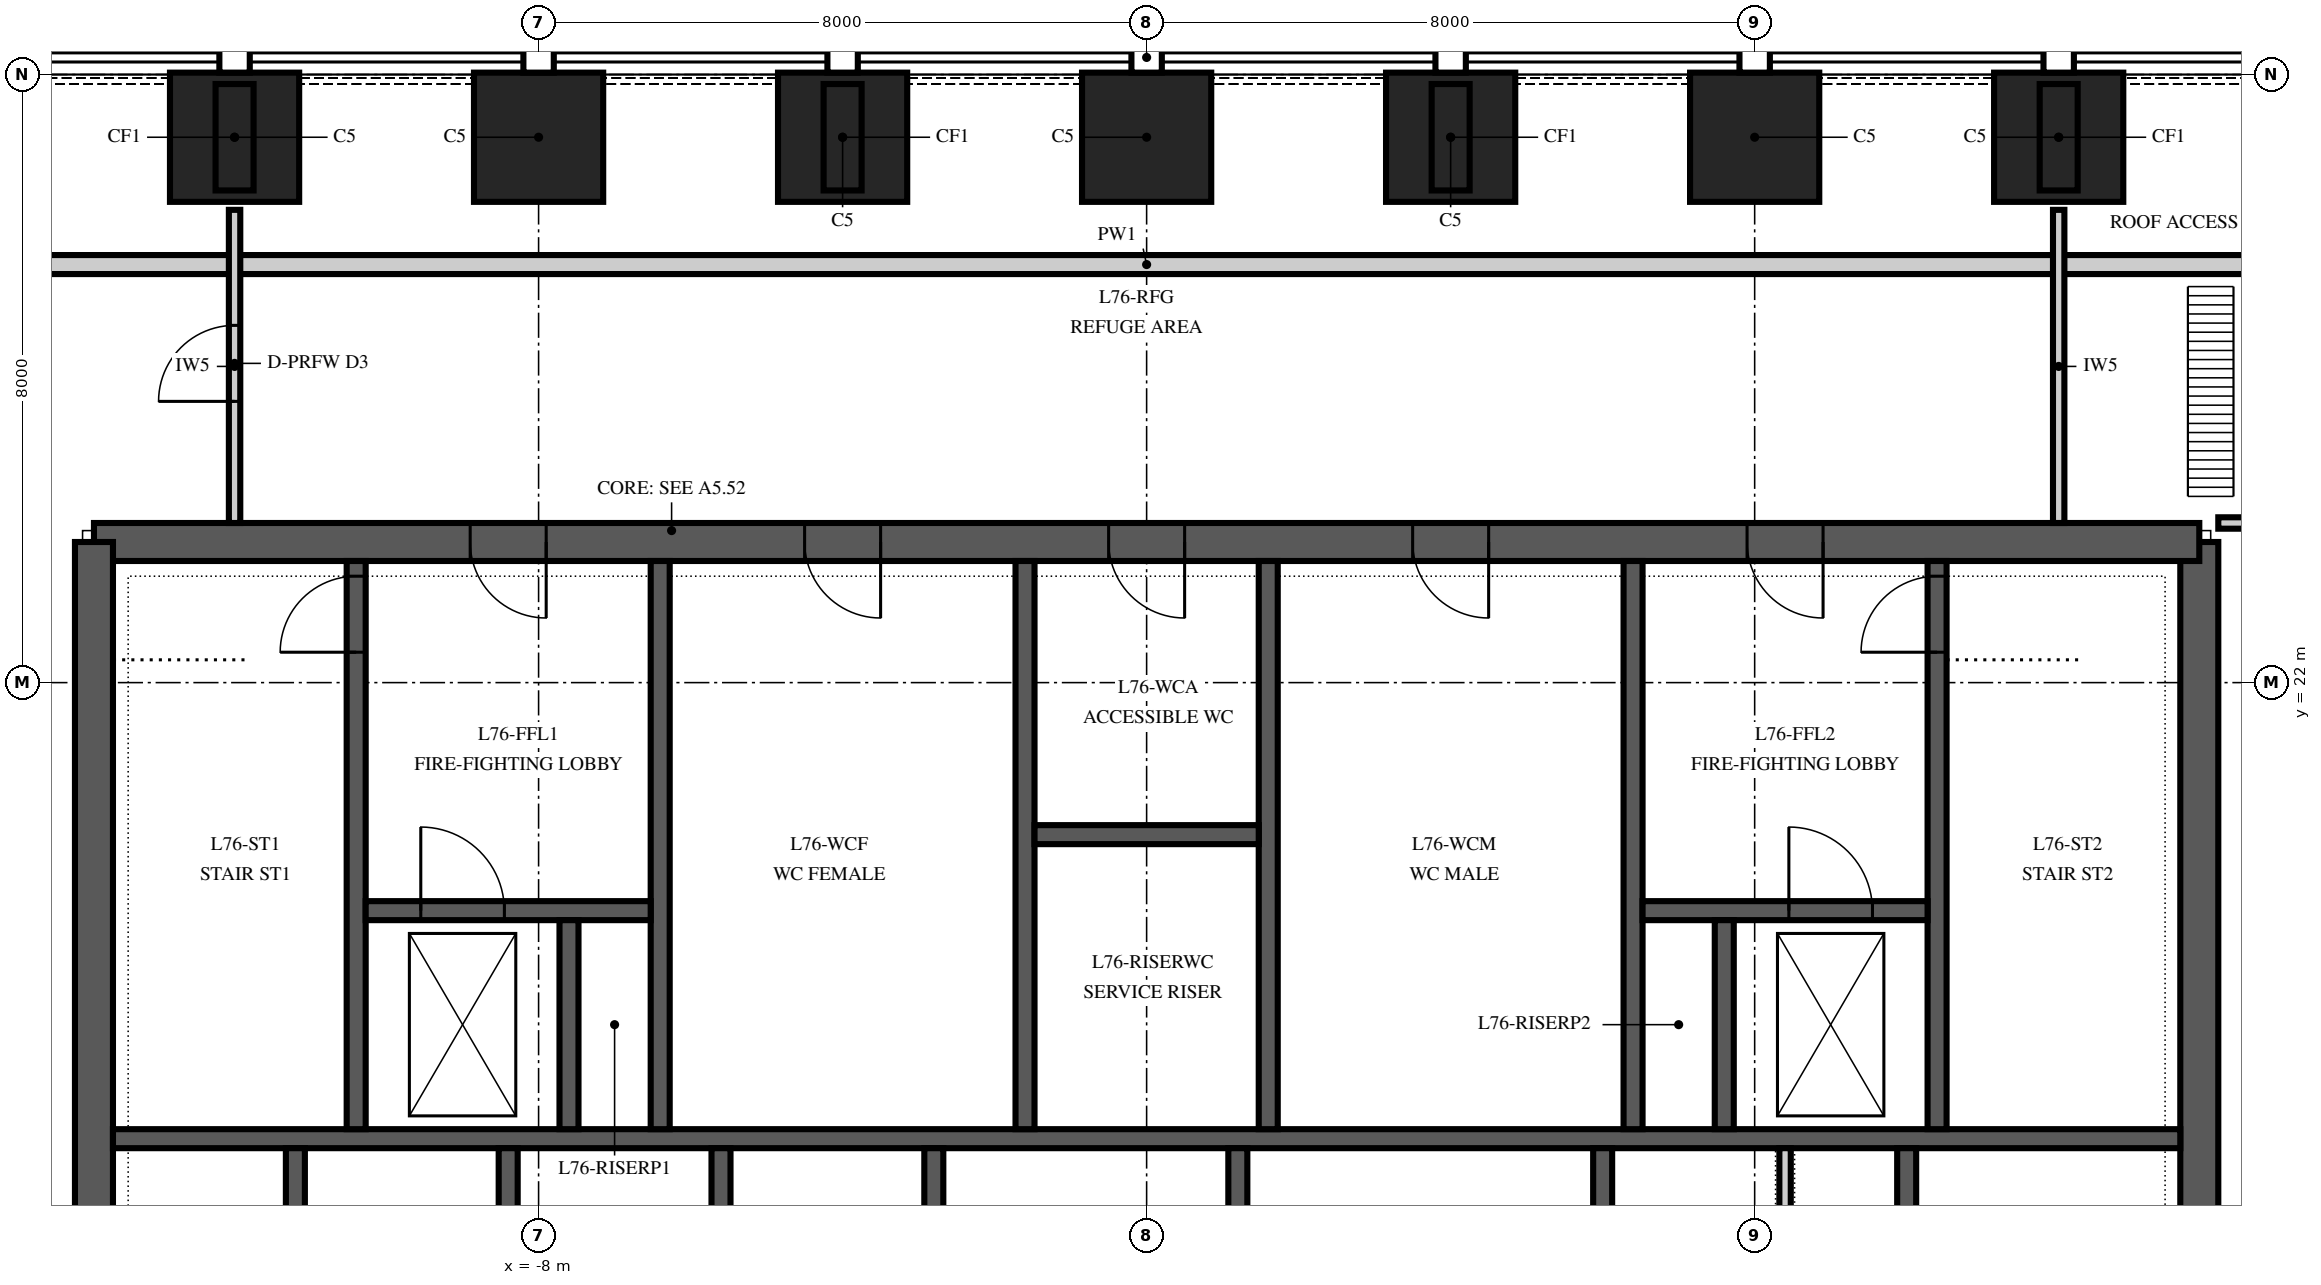
"""IFC4 building model, lengths in metres.
Left out: names, types, materials, properties, quantities, classifications, styles, units other than length and angle.
Written with IfcOpenShell. Run it as: python <this file> out.ifc"""

import sys

from ifc_helpers import new_model, si_unit, direction, frame, frame_2d, origin, origin_2d, place, context, subcontext, project, spatial, polyline, rectangle, hollow_rectangle, outline, extrude, element, fill, save


model = new_model("IFC4")
c1 = context("Model", 3, precision=1e-05, world=origin(), true_north=direction((0.0, 1.0)))
c2 = subcontext(c1, "Body", "Model", "MODEL_VIEW")
j1 = project(units=[si_unit("LENGTHUNIT", "METRE"), si_unit("PLANEANGLEUNIT", "RADIAN")], contexts=[c1])
p1 = place(None, origin())
s1 = spatial("IfcSite", under=j1, at=p1, CompositionType="ELEMENT")
p2 = place(p1, origin())
s2 = spatial("IfcBuilding", under=s1, at=p2, CompositionType="ELEMENT")
p3 = place(p2, frame((0.0, 0.0, 324.0)))
s3 = spatial("IfcBuildingStorey", under=s2, at=p3, CompositionType="ELEMENT", Elevation=324.0)
for number, where, z_axis, x_axis in (
    (1, (12.0, 29.175, 0.0), (0.0, 0.0, 1.0), (-1.0, 0.0, 0.0)),
    (2, (8.0, 29.175, 0.0), (0.0, 0.0, 1.0), (-1.0, 0.0, 0.0)),
    (3, (4.0, 29.175, 0.0), (0.0, 0.0, 1.0), (-1.0, 0.0, 0.0)),
    (4, (0.0, 29.175, 0.0), (0.0, 0.0, 1.0), (-1.0, 0.0, 0.0)),
    (5, (-4.0, 29.175, 0.0), (0.0, 0.0, 1.0), (-1.0, 0.0, 0.0)),
    (6, (-8.0, 29.175, 0.0), (0.0, 0.0, 1.0), (-1.0, 0.0, 0.0)),
    (7, (-12.0, 29.175, 0.0), (0.0, 0.0, 1.0), (-1.0, 0.0, 0.0)),
):
    element("IfcColumn", number, at=place(p3, frame(where, z_axis=z_axis, x_axis=x_axis)), inside=s3, PredefinedType="COLUMN", context=c2, shape_type="SweptSolid", body=[
        extrude(rectangle(XDim=1.7, YDim=1.7, at=origin_2d()), origin(), (0.0, 0.0, 1.0), 6.0),
    ])
p4 = place(p3, frame((13.85, 6.15, 0.0), z_axis=(0.0, 0.0, 1.0), x_axis=(0.0, 1.0, 0.0)))
e8 = element("IfcWall", 8, at=p4, inside=s3, PredefinedType="SHEAR", context=c2, shape_type="SweptSolid", body=[
    extrude(outline(polyline([(0.0, -0.25), (17.7, -0.25), (17.7, 0.0), (17.45, 0.0), (17.45, 0.25), (0.25, 0.25), (0.25, 0.0), (0.0, 0.0), (0.0, -0.25)])), origin(), (0.0, 0.0, 1.0), 6.0),
])
p5 = place(p4, frame((4.15, 0.0, 0.0)))
e9 = element("IfcOpeningElement", 9, at=p5, cuts=e8, PredefinedType="OPENING", context=c2, shape_type="SweptSolid", body=[
    extrude(rectangle(XDim=1.8, YDim=2.4, at=frame_2d((0.9, 1.2))), frame((0.0, 0.265, 0.0), z_axis=(0.0, -1.0, 0.0), x_axis=(1.0, 0.0, 0.0)), (0.0, 0.0, 1.0), 0.53),
])
p6 = place(p3, frame((13.85, 23.85, 0.0), z_axis=(0.0, 0.0, 1.0), x_axis=(-1.0, 0.0, 0.0)))
e10 = element("IfcWall", 10, at=p6, inside=s3, PredefinedType="SHEAR", context=c2, shape_type="SweptSolid", body=[
    extrude(rectangle(XDim=27.7, YDim=0.5, at=frame_2d((13.85, 0.0))), origin(), (0.0, 0.0, 1.0), 6.0),
])
p7 = place(p6, frame((21.75, 0.0, 0.0)))
e11 = element("IfcOpeningElement", 11, at=p7, cuts=e10, PredefinedType="OPENING", context=c2, shape_type="SweptSolid", body=[
    extrude(rectangle(XDim=1.0, YDim=2.1, at=frame_2d((0.5, 1.05))), frame((0.0, 0.265, 0.0), z_axis=(0.0, -1.0, 0.0), x_axis=(1.0, 0.0, 0.0)), (0.0, 0.0, 1.0), 0.53),
])
p8 = place(p6, frame((4.95, 0.0, 0.0)))
e12 = element("IfcOpeningElement", 12, at=p8, cuts=e10, PredefinedType="OPENING", context=c2, shape_type="SweptSolid", body=[
    extrude(rectangle(XDim=1.0, YDim=2.1, at=frame_2d((0.5, 1.05))), frame((0.0, 0.265, 0.0), z_axis=(0.0, -1.0, 0.0), x_axis=(1.0, 0.0, 0.0)), (0.0, 0.0, 1.0), 0.53),
])
p9 = place(p6, frame((17.35, 0.0, 0.0)))
e13 = element("IfcOpeningElement", 13, at=p9, cuts=e10, PredefinedType="OPENING", context=c2, shape_type="SweptSolid", body=[
    extrude(rectangle(XDim=1.0, YDim=2.1, at=frame_2d((0.5, 1.05))), frame((0.0, 0.265, 0.0), z_axis=(0.0, -1.0, 0.0), x_axis=(1.0, 0.0, 0.0)), (0.0, 0.0, 1.0), 0.53),
])
p10 = place(p6, frame((13.35, 0.0, 0.0)))
e14 = element("IfcOpeningElement", 14, at=p10, cuts=e10, PredefinedType="OPENING", context=c2, shape_type="SweptSolid", body=[
    extrude(rectangle(XDim=1.0, YDim=2.1, at=frame_2d((0.5, 1.05))), frame((0.0, 0.265, 0.0), z_axis=(0.0, -1.0, 0.0), x_axis=(1.0, 0.0, 0.0)), (0.0, 0.0, 1.0), 0.53),
])
p11 = place(p6, frame((9.35, 0.0, 0.0)))
e15 = element("IfcOpeningElement", 15, at=p11, cuts=e10, PredefinedType="OPENING", context=c2, shape_type="SweptSolid", body=[
    extrude(rectangle(XDim=1.0, YDim=2.1, at=frame_2d((0.5, 1.05))), frame((0.0, 0.265, 0.0), z_axis=(0.0, -1.0, 0.0), x_axis=(1.0, 0.0, 0.0)), (0.0, 0.0, 1.0), 0.53),
])
p12 = place(p3, frame((-13.85, 23.85, 0.0), z_axis=(0.0, 0.0, 1.0), x_axis=(0.0, -1.0, 0.0)))
e16 = element("IfcWall", 16, at=p12, inside=s3, PredefinedType="SHEAR", context=c2, shape_type="SweptSolid", body=[
    extrude(outline(polyline([(0.0, -0.25), (17.7, -0.25), (17.7, 0.0), (17.45, 0.0), (17.45, 0.25), (0.25, 0.25), (0.25, 0.0), (0.0, 0.0), (0.0, -0.25)])), origin(), (0.0, 0.0, 1.0), 6.0),
])
p13 = place(p12, frame((11.75, 0.0, 0.0)))
e17 = element("IfcOpeningElement", 17, at=p13, cuts=e16, PredefinedType="OPENING", context=c2, shape_type="SweptSolid", body=[
    extrude(rectangle(XDim=1.8, YDim=2.4, at=frame_2d((0.9, 1.2))), frame((0.0, 0.265, 0.0), z_axis=(0.0, -1.0, 0.0), x_axis=(1.0, 0.0, 0.0)), (0.0, 0.0, 1.0), 0.53),
])
p14 = place(p3, frame((-13.6, 16.0, 0.0), z_axis=(0.0, 0.0, 1.0), x_axis=(1.0, 0.0, 0.0)))
e18 = element("IfcWall", 18, at=p14, inside=s3, PredefinedType="SHEAR", context=c2, shape_type="SweptSolid", body=[
    extrude(rectangle(XDim=27.2, YDim=0.25, at=frame_2d((13.6, 0.0))), origin(), (0.0, 0.0, 1.0), 6.0),
])
for number, where, z_axis, x_axis in (
    (19, (-11.2, 13.125, 0.0), (0.0, 0.0, 1.0), (0.0, 1.0, 0.0)),
    (20, (-8.4, 13.125, 0.0), (0.0, 0.0, 1.0), (0.0, 1.0, 0.0)),
    (21, (-5.6, 13.125, 0.0), (0.0, 0.0, 1.0), (0.0, 1.0, 0.0)),
    (22, (-2.8, 13.125, 0.0), (0.0, 0.0, 1.0), (0.0, 1.0, 0.0)),
    (23, (1.2, 13.125, 0.0), (0.0, 0.0, 1.0), (0.0, 1.0, 0.0)),
    (24, (6.0, 13.125, 0.0), (0.0, 0.0, 1.0), (0.0, 1.0, 0.0)),
    (25, (10.0, 13.125, 0.0), (0.0, 0.0, 1.0), (0.0, 1.0, 0.0)),
):
    element("IfcWall", number, at=place(p3, frame(where, z_axis=z_axis, x_axis=x_axis)), inside=s3, PredefinedType="SHEAR", context=c2, shape_type="SweptSolid", body=[
        extrude(rectangle(XDim=2.75, YDim=0.25, at=frame_2d((1.375, 0.0))), origin(), (0.0, 0.0, 1.0), 6.0),
    ])
p15 = place(p3, frame((-10.4, 16.125, 0.0), z_axis=(0.0, 0.0, 1.0), x_axis=(0.0, 1.0, 0.0)))
e26 = element("IfcWall", 26, at=p15, inside=s3, PredefinedType="SHEAR", context=c2, shape_type="SweptSolid", body=[
    extrude(rectangle(XDim=7.475, YDim=0.25, at=frame_2d((3.738, 0.0))), origin(), (0.0, 0.0, 1.0), 6.0),
])
p16 = place(p15, frame((6.275, 0.0, 0.0)))
e27 = element("IfcOpeningElement", 27, at=p16, cuts=e26, PredefinedType="OPENING", context=c2, shape_type="SweptSolid", body=[
    extrude(rectangle(XDim=1.0, YDim=2.1, at=frame_2d((0.5, 1.05))), frame((0.0, 0.14, 0.0), z_axis=(0.0, -1.0, 0.0), x_axis=(1.0, 0.0, 0.0)), (0.0, 0.0, 1.0), 0.28),
])
for number, where, z_axis, x_axis in (
    (28, (-6.4, 16.125, 0.0), (0.0, 0.0, 1.0), (0.0, 1.0, 0.0)),
    (29, (-1.6, 16.125, 0.0), (0.0, 0.0, 1.0), (0.0, 1.0, 0.0)),
    (30, (1.6, 16.125, 0.0), (0.0, 0.0, 1.0), (0.0, 1.0, 0.0)),
    (31, (6.4, 16.125, 0.0), (0.0, 0.0, 1.0), (0.0, 1.0, 0.0)),
):
    element("IfcWall", number, at=place(p3, frame(where, z_axis=z_axis, x_axis=x_axis)), inside=s3, PredefinedType="SHEAR", context=c2, shape_type="SweptSolid", body=[
        extrude(rectangle(XDim=7.475, YDim=0.25, at=frame_2d((3.738, 0.0))), origin(), (0.0, 0.0, 1.0), 6.0),
    ])
p17 = place(p3, frame((10.4, 16.125, 0.0), z_axis=(0.0, 0.0, 1.0), x_axis=(0.0, 1.0, 0.0)))
e32 = element("IfcWall", 32, at=p17, inside=s3, PredefinedType="SHEAR", context=c2, shape_type="SweptSolid", body=[
    extrude(rectangle(XDim=7.475, YDim=0.25, at=frame_2d((3.738, 0.0))), origin(), (0.0, 0.0, 1.0), 6.0),
])
p18 = place(p17, frame((6.275, 0.0, 0.0)))
e33 = element("IfcOpeningElement", 33, at=p18, cuts=e32, PredefinedType="OPENING", context=c2, shape_type="SweptSolid", body=[
    extrude(rectangle(XDim=1.0, YDim=2.1, at=frame_2d((0.5, 1.05))), frame((0.0, 0.14, 0.0), z_axis=(0.0, -1.0, 0.0), x_axis=(1.0, 0.0, 0.0)), (0.0, 0.0, 1.0), 0.28),
])
p19 = place(p3, frame((-10.275, 19.0, 0.0), z_axis=(0.0, 0.0, 1.0), x_axis=(1.0, 0.0, 0.0)))
e34 = element("IfcWall", 34, at=p19, inside=s3, PredefinedType="SHEAR", context=c2, shape_type="SweptSolid", body=[
    extrude(rectangle(XDim=3.75, YDim=0.25, at=frame_2d((1.875, 0.0))), origin(), (0.0, 0.0, 1.0), 6.0),
])
p20 = place(p19, frame((0.725, 0.0, 0.0)))
e35 = element("IfcOpeningElement", 35, at=p20, cuts=e34, PredefinedType="OPENING", context=c2, shape_type="SweptSolid", body=[
    extrude(rectangle(XDim=1.1, YDim=2.1, at=frame_2d((0.55, 1.05))), frame((0.0, 0.14, 0.0), z_axis=(0.0, -1.0, 0.0), x_axis=(1.0, 0.0, 0.0)), (0.0, 0.0, 1.0), 0.28),
])
p21 = place(p3, frame((6.525, 19.0, 0.0), z_axis=(0.0, 0.0, 1.0), x_axis=(1.0, 0.0, 0.0)))
e36 = element("IfcWall", 36, at=p21, inside=s3, PredefinedType="SHEAR", context=c2, shape_type="SweptSolid", body=[
    extrude(rectangle(XDim=3.75, YDim=0.25, at=frame_2d((1.875, 0.0))), origin(), (0.0, 0.0, 1.0), 6.0),
])
p22 = place(p21, frame((1.925, 0.0, 0.0)))
e37 = element("IfcOpeningElement", 37, at=p22, cuts=e36, PredefinedType="OPENING", context=c2, shape_type="SweptSolid", body=[
    extrude(rectangle(XDim=1.1, YDim=2.1, at=frame_2d((0.55, 1.05))), frame((0.0, 0.14, 0.0), z_axis=(0.0, -1.0, 0.0), x_axis=(1.0, 0.0, 0.0)), (0.0, 0.0, 1.0), 0.28),
])
for number, where, z_axis, x_axis in (
    (38, (-7.6, 16.125, 0.0), (0.0, 0.0, 1.0), (0.0, 1.0, 0.0)),
    (39, (7.6, 16.125, 0.0), (0.0, 0.0, 1.0), (0.0, 1.0, 0.0)),
):
    element("IfcWall", number, at=place(p3, frame(where, z_axis=z_axis, x_axis=x_axis)), inside=s3, PredefinedType="SHEAR", context=c2, shape_type="SweptSolid", body=[
        extrude(rectangle(XDim=2.75, YDim=0.25, at=frame_2d((1.375, 0.0))), origin(), (0.0, 0.0, 1.0), 6.0),
    ])
p23 = place(p3, frame((-1.475, 20.0, 0.0), z_axis=(0.0, 0.0, 1.0), x_axis=(1.0, 0.0, 0.0)))
e40 = element("IfcWall", 40, at=p23, inside=s3, PredefinedType="SHEAR", context=c2, shape_type="SweptSolid", body=[
    extrude(rectangle(XDim=2.95, YDim=0.25, at=frame_2d((1.475, 0.0))), origin(), (0.0, 0.0, 1.0), 6.0),
])
for number, where, z_axis, x_axis in (
    (41, (12.0, 29.175, 6.0), (0.0, 0.0, 1.0), (-1.0, 0.0, 0.0)),
    (42, (4.0, 29.175, 6.0), (0.0, 0.0, 1.0), (-1.0, 0.0, 0.0)),
    (43, (-4.0, 29.175, 6.0), (0.0, 0.0, 1.0), (-1.0, 0.0, 0.0)),
    (44, (-12.0, 29.175, 6.0), (0.0, 0.0, 1.0), (-1.0, 0.0, 0.0)),
):
    element("IfcColumn", number, at=place(p3, frame(where, z_axis=z_axis, x_axis=x_axis)), inside=s3, PredefinedType="COLUMN", context=c2, shape_type="SweptSolid", body=[
        extrude(hollow_rectangle(XDim=0.5, YDim=1.4, WallThickness=0.04, at=origin_2d()), origin(), (0.0, 0.0, 1.0), 24.0),
    ])
p24 = place(p3, frame((19.327, 27.5, 6.0), z_axis=(0.0, 0.0, 1.0), x_axis=(-1.0, 0.0, 0.0)))
e45 = element("IfcWall", 45, at=p24, inside=s3, PredefinedType="PARAPET", context=c2, shape_type="SweptSolid", body=[
    extrude(rectangle(XDim=38.653, YDim=0.25, at=frame_2d((19.327, 0.0))), origin(), (0.0, 0.0, 1.0), 1.1),
])
p25 = place(p3, frame((8.4, 13.125, 0.0), z_axis=(0.0, 0.0, 1.0), x_axis=(0.0, 1.0, 0.0)))
e46 = element("IfcWall", 46, at=p25, inside=s3, PredefinedType="PARTITIONING", context=c2, shape_type="SweptSolid", body=[
    extrude(rectangle(XDim=2.75, YDim=0.15, at=frame_2d((1.375, 0.0))), origin(), (0.0, 0.0, 1.0), 5.85),
])
p26 = place(p3, frame((12.0, 24.1, 0.0), z_axis=(0.0, 0.0, 1.0), x_axis=(0.0, 1.0, 0.0)))
e47 = element("IfcWall", 47, at=p26, inside=s3, PredefinedType="PARTITIONING", context=c2, shape_type="SweptSolid", body=[
    extrude(rectangle(XDim=4.12, YDim=0.15, at=frame_2d((2.06, 0.0))), origin(), (0.0, 0.0, 1.0), 5.75),
])
p27 = place(p3, frame((-12.0, 24.1, 0.0), z_axis=(0.0, 0.0, 1.0), x_axis=(0.0, 1.0, 0.0)))
e48 = element("IfcWall", 48, at=p27, inside=s3, PredefinedType="PARTITIONING", context=c2, shape_type="SweptSolid", body=[
    extrude(rectangle(XDim=4.12, YDim=0.15, at=frame_2d((2.06, 0.0))), origin(), (0.0, 0.0, 1.0), 5.75),
])
p28 = place(p27, frame((1.6, 0.0, 0.0)))
e49 = element("IfcOpeningElement", 49, at=p28, cuts=e48, PredefinedType="OPENING", context=c2, shape_type="SweptSolid", body=[
    extrude(rectangle(XDim=1.0, YDim=2.1, at=frame_2d((0.5, 1.05))), frame((0.0, 0.09, 0.0), z_axis=(0.0, -1.0, 0.0), x_axis=(1.0, 0.0, 0.0)), (0.0, 0.0, 1.0), 0.18),
])
p29 = place(p3, frame((14.1, 24.1, 0.0), z_axis=(0.0, 0.0, 1.0), x_axis=(1.0, 0.0, 0.0)))
e50 = element("IfcWall", 50, at=p29, inside=s3, PredefinedType="PARTITIONING", context=c2, shape_type="SweptSolid", body=[
    extrude(rectangle(XDim=1.9, YDim=0.15, at=frame_2d((0.95, 0.0))), origin(), (0.0, 0.0, 1.0), 5.75),
])
p30 = place(p7, origin())
e51 = element("IfcDoor", 51, at=p30, inside=s3, OperationType="SINGLE_SWING_RIGHT", PredefinedType="DOOR", context=c2, shape_type="SweptSolid", body=[
    extrude(rectangle(XDim=1.0, YDim=2.1, at=frame_2d((0.5, 1.05))), frame((0.0, 0.25, 0.0), z_axis=(0.0, -1.0, 0.0), x_axis=(1.0, 0.0, 0.0)), (0.0, 0.0, 1.0), 0.5),
])
fill(e11, e51)
p31 = place(p8, origin())
e52 = element("IfcDoor", 52, at=p31, inside=s3, OperationType="SINGLE_SWING_RIGHT", PredefinedType="DOOR", context=c2, shape_type="SweptSolid", body=[
    extrude(rectangle(XDim=1.0, YDim=2.1, at=frame_2d((0.5, 1.05))), frame((0.0, 0.25, 0.0), z_axis=(0.0, -1.0, 0.0), x_axis=(1.0, 0.0, 0.0)), (0.0, 0.0, 1.0), 0.5),
])
fill(e12, e52)
p32 = place(p9, origin())
e53 = element("IfcDoor", 53, at=p32, inside=s3, OperationType="SINGLE_SWING_LEFT", PredefinedType="DOOR", context=c2, shape_type="SweptSolid", body=[
    extrude(rectangle(XDim=1.0, YDim=2.1, at=frame_2d((0.5, 1.05))), frame((0.0, 0.25, 0.0), z_axis=(0.0, -1.0, 0.0), x_axis=(1.0, 0.0, 0.0)), (0.0, 0.0, 1.0), 0.5),
])
fill(e13, e53)
p33 = place(p10, origin())
e54 = element("IfcDoor", 54, at=p33, inside=s3, OperationType="SINGLE_SWING_LEFT", PredefinedType="DOOR", context=c2, shape_type="SweptSolid", body=[
    extrude(rectangle(XDim=1.0, YDim=2.1, at=frame_2d((0.5, 1.05))), frame((0.0, 0.25, 0.0), z_axis=(0.0, -1.0, 0.0), x_axis=(1.0, 0.0, 0.0)), (0.0, 0.0, 1.0), 0.5),
])
fill(e14, e54)
p34 = place(p11, origin())
e55 = element("IfcDoor", 55, at=p34, inside=s3, OperationType="SINGLE_SWING_LEFT", PredefinedType="DOOR", context=c2, shape_type="SweptSolid", body=[
    extrude(rectangle(XDim=1.0, YDim=2.1, at=frame_2d((0.5, 1.05))), frame((0.0, 0.25, 0.0), z_axis=(0.0, -1.0, 0.0), x_axis=(1.0, 0.0, 0.0)), (0.0, 0.0, 1.0), 0.5),
])
fill(e15, e55)
p35 = place(p16, origin())
e56 = element("IfcDoor", 56, at=p35, inside=s3, OperationType="SINGLE_SWING_LEFT", PredefinedType="DOOR", context=c2, shape_type="SweptSolid", body=[
    extrude(rectangle(XDim=1.0, YDim=2.1, at=frame_2d((0.5, 1.05))), frame((0.0, 0.125, 0.0), z_axis=(0.0, -1.0, 0.0), x_axis=(1.0, 0.0, 0.0)), (0.0, 0.0, 1.0), 0.25),
])
fill(e27, e56)
p36 = place(p18, origin())
e57 = element("IfcDoor", 57, at=p36, inside=s3, OperationType="SINGLE_SWING_LEFT", PredefinedType="DOOR", context=c2, shape_type="SweptSolid", body=[
    extrude(rectangle(XDim=1.0, YDim=2.1, at=frame_2d((0.5, 1.05))), frame((0.0, 0.125, 0.0), z_axis=(0.0, -1.0, 0.0), x_axis=(1.0, 0.0, 0.0)), (0.0, 0.0, 1.0), 0.25),
])
fill(e33, e57)
p37 = place(p22, origin())
e58 = element("IfcDoor", 58, at=p37, inside=s3, OperationType="SLIDING_TO_RIGHT", PredefinedType="DOOR", context=c2, shape_type="SweptSolid", body=[
    extrude(rectangle(XDim=1.1, YDim=2.1, at=frame_2d((0.55, 1.05))), frame((0.0, 0.125, 0.0), z_axis=(0.0, -1.0, 0.0), x_axis=(1.0, 0.0, 0.0)), (0.0, 0.0, 1.0), 0.25),
])
fill(e37, e58)
p38 = place(p20, origin())
e59 = element("IfcDoor", 59, at=p38, inside=s3, OperationType="SLIDING_TO_RIGHT", PredefinedType="DOOR", context=c2, shape_type="SweptSolid", body=[
    extrude(rectangle(XDim=1.1, YDim=2.1, at=frame_2d((0.55, 1.05))), frame((0.0, 0.125, 0.0), z_axis=(0.0, -1.0, 0.0), x_axis=(1.0, 0.0, 0.0)), (0.0, 0.0, 1.0), 0.25),
])
fill(e35, e59)
p39 = place(p28, origin())
e60 = element("IfcDoor", 60, at=p39, inside=s3, OperationType="SINGLE_SWING_RIGHT", PredefinedType="DOOR", context=c2, shape_type="SweptSolid", body=[
    extrude(rectangle(XDim=1.0, YDim=2.1, at=frame_2d((0.5, 1.05))), frame((0.0, 0.075, 0.0), z_axis=(0.0, -1.0, 0.0), x_axis=(1.0, 0.0, 0.0)), (0.0, 0.0, 1.0), 0.149),
])
fill(e49, e60)
save(model, sys.argv[1])
